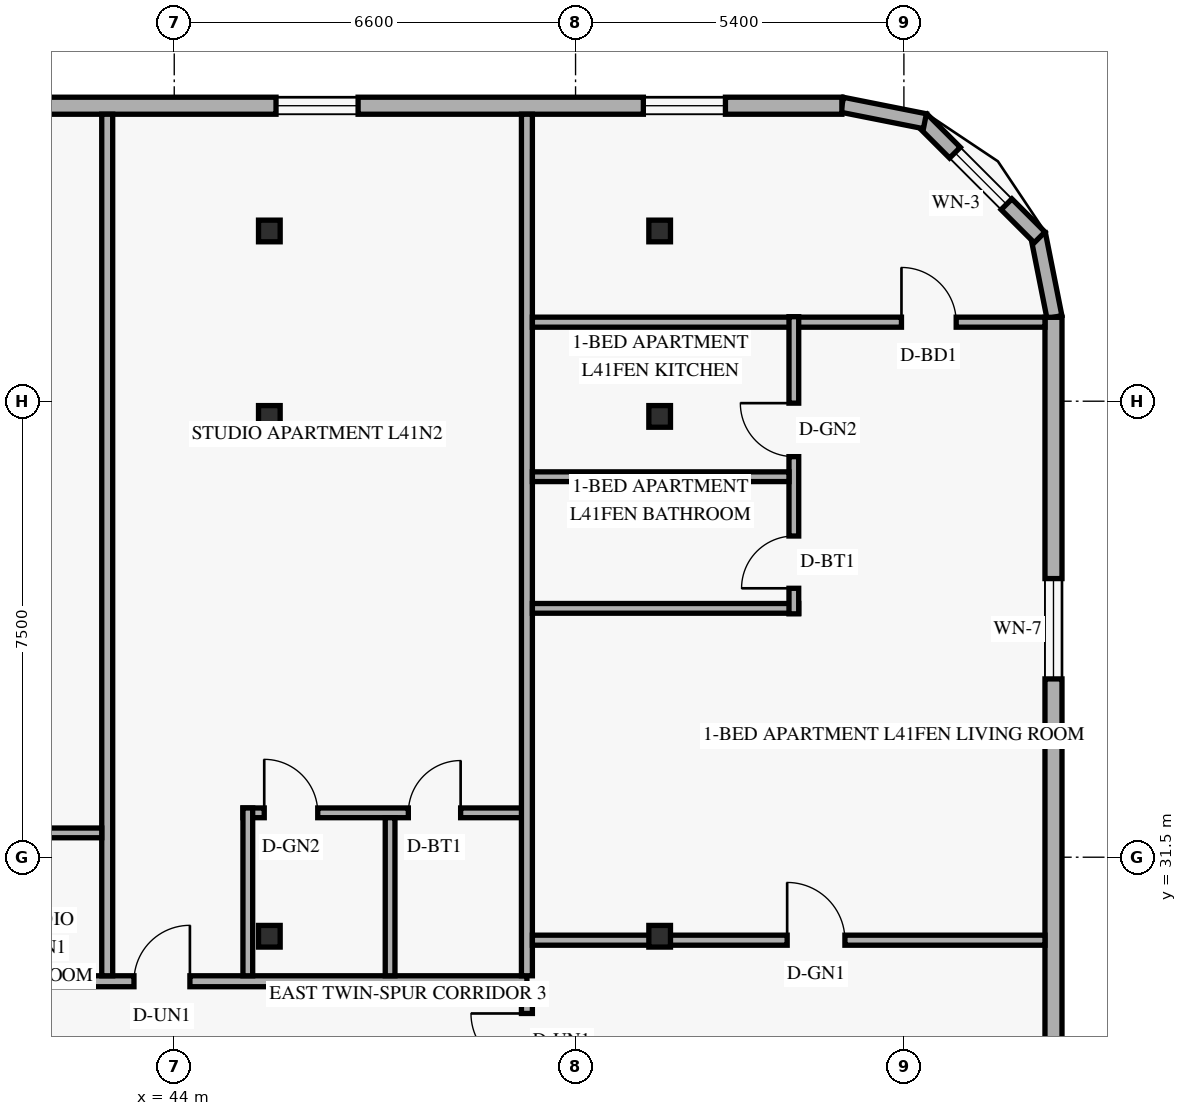
"""IFC4 building model, lengths in metres.
Left out: names, types, materials, properties, quantities, classifications, styles, units other than length and angle.
Written with IfcOpenShell. Run it as: python <this file> out.ifc"""

import sys

from ifc_helpers import new_model, si_unit, direction, frame, frame_2d, origin, origin_2d, place, context, subcontext, project, spatial, rectangle, hollow_rectangle, extrude, element, fill, save


model = new_model("IFC4")
c1 = context("Model", 3, precision=1e-05, world=origin(), true_north=direction((0.0, 1.0)))
c2 = subcontext(c1, "Body", "Model", "MODEL_VIEW")
j1 = project(units=[si_unit("LENGTHUNIT", "METRE"), si_unit("PLANEANGLEUNIT", "RADIAN")], contexts=[c1])
p1 = place(None, origin())
s1 = spatial("IfcSite", under=j1, at=p1, CompositionType="ELEMENT")
p2 = place(p1, origin())
s2 = spatial("IfcBuilding", under=s1, at=p2, CompositionType="ELEMENT")
p3 = place(p2, frame((0.0, 0.0, 159.0)))
s3 = spatial("IfcBuildingStorey", under=s2, at=p3, CompositionType="ELEMENT", Elevation=159.0)
for number, where, z_axis, x_axis in (
    (1, (45.501, 30.2, 0.0), (0.035, 0.0, 0.999), (0.0, 1.0, 0.0)),
    (2, (45.501, 38.75, 0.0), (0.035, 0.0, 0.999), (0.0, 1.0, 0.0)),
    (3, (45.501, 41.8, 0.0), (0.035, 0.0, 0.999), (0.0, 1.0, 0.0)),
):
    element("IfcColumn", number, at=place(p3, frame(where, z_axis=z_axis, x_axis=x_axis)), inside=s3, PredefinedType="COLUMN", context=c2, shape_type="SweptSolid", body=[
        extrude(hollow_rectangle(XDim=0.356, YDim=0.356, WallThickness=0.016, at=origin_2d()), origin(), (0.0, 0.0, 1.0), 3.602),
    ])
for number, where, z_axis, x_axis in (
    (4, (51.879, 30.2, 0.0), (0.058, 0.0, 0.998), (0.0, 1.0, 0.0)),
    (5, (51.879, 38.75, 0.0), (0.058, 0.0, 0.998), (0.0, 1.0, 0.0)),
    (6, (51.879, 41.8, 0.0), (0.058, 0.0, 0.998), (0.0, 1.0, 0.0)),
):
    element("IfcColumn", number, at=place(p3, frame(where, z_axis=z_axis, x_axis=x_axis)), inside=s3, PredefinedType="COLUMN", context=c2, shape_type="SweptSolid", body=[
        extrude(hollow_rectangle(XDim=0.356, YDim=0.356, WallThickness=0.016, at=origin_2d()), origin(), (0.0, 0.0, 1.0), 3.606),
    ])
p4 = place(p3, frame((58.476, 40.384, 0.0), z_axis=(0.0, 0.0, 1.0), x_axis=(-0.19496651342, 0.980809899341, 0.0)))
e7 = element("IfcWall", 7, at=p4, inside=s3, PredefinedType="SOLIDWALL", context=c2, shape_type="SweptSolid", body=[
    extrude(rectangle(XDim=1.389, YDim=0.25, at=frame_2d((0.694, 0.0))), origin(), (0.0, 0.0, 1.0), 3.36),
])
p5 = place(p3, frame((58.232, 41.695, 0.0), z_axis=(0.0, 0.0, 1.0), x_axis=(-0.707106781187, 0.707106781187, 0.0)))
e8 = element("IfcWall", 8, at=p5, inside=s3, PredefinedType="SOLIDWALL", context=c2, shape_type="SweptSolid", body=[
    extrude(rectangle(XDim=2.739, YDim=0.25, at=frame_2d((1.37, 0.0))), origin(), (0.0, 0.0, 1.0), 3.36),
])
p6 = place(p5, frame((0.77, 0.0, 0.85)))
e9 = element("IfcOpeningElement", 9, at=p6, cuts=e8, PredefinedType="OPENING", context=c2, shape_type="SweptSolid", body=[
    extrude(rectangle(XDim=1.2, YDim=1.5, at=frame_2d((0.6, 0.75))), frame((0.0, 0.135, 0.0), z_axis=(0.0, -1.0, 0.0), x_axis=(1.0, 0.0, 0.0)), (0.0, 0.0, 1.0), 0.27),
])
p7 = place(p3, frame((56.345, 43.605, 0.0), z_axis=(0.0, 0.0, 1.0), x_axis=(-0.980809899341, 0.19496651342, 0.0)))
e10 = element("IfcWall", 10, at=p7, inside=s3, PredefinedType="SOLIDWALL", context=c2, shape_type="SweptSolid", body=[
    extrude(rectangle(XDim=1.389, YDim=0.25, at=frame_2d((0.694, 0.0))), origin(), (0.0, 0.0, 1.0), 3.36),
])
p8 = place(p3, frame((58.46, 7.62, 0.0), z_axis=(0.0, 0.0, 1.0), x_axis=(0.0, 1.0, 0.0)))
e11 = element("IfcWall", 11, at=p8, inside=s3, PredefinedType="SOLIDWALL", context=c2, shape_type="SweptSolid", body=[
    extrude(rectangle(XDim=32.76, YDim=0.28, at=frame_2d((16.38, 0.0))), origin(), (0.0, 0.0, 1.0), 3.36),
])
p9 = place(p8, frame((4.29, 0.0, 0.85)))
e12 = element("IfcOpeningElement", 12, at=p9, cuts=e11, PredefinedType="OPENING", context=c2, shape_type="SweptSolid", body=[
    extrude(rectangle(XDim=1.65, YDim=1.6, at=frame_2d((0.825, 0.8))), frame((0.0, 0.15, 0.0), z_axis=(0.0, -1.0, 0.0), x_axis=(1.0, 0.0, 0.0)), (0.0, 0.0, 1.0), 0.3),
])
p10 = place(p8, frame((12.08, 0.0, 0.85)))
e13 = element("IfcOpeningElement", 13, at=p10, cuts=e11, PredefinedType="OPENING", context=c2, shape_type="SweptSolid", body=[
    extrude(rectangle(XDim=1.65, YDim=1.6, at=frame_2d((0.825, 0.8))), frame((0.0, 0.15, 0.0), z_axis=(0.0, -1.0, 0.0), x_axis=(1.0, 0.0, 0.0)), (0.0, 0.0, 1.0), 0.3),
])
p11 = place(p8, frame((18.223, 0.0, 0.85)))
e14 = element("IfcOpeningElement", 14, at=p11, cuts=e11, PredefinedType="OPENING", context=c2, shape_type="SweptSolid", body=[
    extrude(rectangle(XDim=1.65, YDim=1.6, at=frame_2d((0.825, 0.8))), frame((0.0, 0.15, 0.0), z_axis=(0.0, -1.0, 0.0), x_axis=(1.0, 0.0, 0.0)), (0.0, 0.0, 1.0), 0.3),
])
p12 = place(p8, frame((26.812, 0.0, 0.85)))
e15 = element("IfcOpeningElement", 15, at=p12, cuts=e11, PredefinedType="OPENING", context=c2, shape_type="SweptSolid", body=[
    extrude(rectangle(XDim=1.65, YDim=1.6, at=frame_2d((0.825, 0.8))), frame((0.0, 0.15, 0.0), z_axis=(0.0, -1.0, 0.0), x_axis=(1.0, 0.0, 0.0)), (0.0, 0.0, 1.0), 0.3),
])
p13 = place(p3, frame((54.98, 43.86, 0.0), z_axis=(0.0, 0.0, 1.0), x_axis=(-1.0, 0.0, 0.0)))
e16 = element("IfcWall", 16, at=p13, inside=s3, PredefinedType="SOLIDWALL", context=c2, shape_type="SweptSolid", body=[
    extrude(rectangle(XDim=33.76, YDim=0.28, at=frame_2d((16.88, 0.0))), origin(), (0.0, 0.0, 1.0), 3.36),
])
p14 = place(p13, frame((28.705, 0.0, 0.85)))
e17 = element("IfcOpeningElement", 17, at=p14, cuts=e16, PredefinedType="OPENING", context=c2, shape_type="SweptSolid", body=[
    extrude(rectangle(XDim=1.35, YDim=1.55, at=frame_2d((0.675, 0.775))), frame((0.0, 0.15, 0.0), z_axis=(0.0, -1.0, 0.0), x_axis=(1.0, 0.0, 0.0)), (0.0, 0.0, 1.0), 0.3),
])
p15 = place(p13, frame((21.82, 0.0, 0.85)))
e18 = element("IfcOpeningElement", 18, at=p15, cuts=e16, PredefinedType="OPENING", context=c2, shape_type="SweptSolid", body=[
    extrude(rectangle(XDim=1.35, YDim=1.55, at=frame_2d((0.675, 0.775))), frame((0.0, 0.15, 0.0), z_axis=(0.0, -1.0, 0.0), x_axis=(1.0, 0.0, 0.0)), (0.0, 0.0, 1.0), 0.3),
])
p16 = place(p13, frame((15.146, 0.0, 0.85)))
e19 = element("IfcOpeningElement", 19, at=p16, cuts=e16, PredefinedType="OPENING", context=c2, shape_type="SweptSolid", body=[
    extrude(rectangle(XDim=1.35, YDim=1.55, at=frame_2d((0.675, 0.775))), frame((0.0, 0.15, 0.0), z_axis=(0.0, -1.0, 0.0), x_axis=(1.0, 0.0, 0.0)), (0.0, 0.0, 1.0), 0.3),
])
p17 = place(p13, frame((7.956, 0.0, 0.85)))
e20 = element("IfcOpeningElement", 20, at=p17, cuts=e16, PredefinedType="OPENING", context=c2, shape_type="SweptSolid", body=[
    extrude(rectangle(XDim=1.35, YDim=1.55, at=frame_2d((0.675, 0.775))), frame((0.0, 0.15, 0.0), z_axis=(0.0, -1.0, 0.0), x_axis=(1.0, 0.0, 0.0)), (0.0, 0.0, 1.0), 0.3),
])
p18 = place(p13, frame((1.915, 0.0, 0.85)))
e21 = element("IfcOpeningElement", 21, at=p18, cuts=e16, PredefinedType="OPENING", context=c2, shape_type="SweptSolid", body=[
    extrude(rectangle(XDim=1.35, YDim=1.55, at=frame_2d((0.675, 0.775))), frame((0.0, 0.15, 0.0), z_axis=(0.0, -1.0, 0.0), x_axis=(1.0, 0.0, 0.0)), (0.0, 0.0, 1.0), 0.3),
])
p19 = place(p3, frame((35.51, 29.46, 0.0), z_axis=(0.0, 0.0, 1.0), x_axis=(1.0, 0.0, 0.0)))
e22 = element("IfcWall", 22, at=p19, inside=s3, PredefinedType="STANDARD", context=c2, shape_type="SweptSolid", body=[
    extrude(rectangle(XDim=14.29, YDim=0.18, at=frame_2d((7.145, 0.0))), origin(), (0.0, 0.0, 1.0), 2.73),
])
p20 = place(p19, frame((0.35, 0.0, 0.0)))
e23 = element("IfcOpeningElement", 23, at=p20, cuts=e22, PredefinedType="OPENING", context=c2, shape_type="SweptSolid", body=[
    extrude(rectangle(XDim=0.92, YDim=2.15, at=frame_2d((0.46, 1.075))), frame((0.0, 0.1, 0.0), z_axis=(0.0, -1.0, 0.0), x_axis=(1.0, 0.0, 0.0)), (0.0, 0.0, 1.0), 0.2),
])
p21 = place(p19, frame((7.828, 0.0, 0.0)))
e24 = element("IfcOpeningElement", 24, at=p21, cuts=e22, PredefinedType="OPENING", context=c2, shape_type="SweptSolid", body=[
    extrude(rectangle(XDim=0.92, YDim=2.15, at=frame_2d((0.46, 1.075))), frame((0.0, 0.1, 0.0), z_axis=(0.0, -1.0, 0.0), x_axis=(1.0, 0.0, 0.0)), (0.0, 0.0, 1.0), 0.2),
])
p22 = place(p3, frame((42.898, 29.55, 0.0), z_axis=(0.0, 0.0, 1.0), x_axis=(0.0, 1.0, 0.0)))
e25 = element("IfcWall", 25, at=p22, inside=s3, PredefinedType="PARTITIONING", context=c2, shape_type="SweptSolid", body=[
    extrude(rectangle(XDim=14.17, YDim=0.18, at=frame_2d((7.085, 0.0))), origin(), (0.0, 0.0, 1.0), 2.73),
])
p23 = place(p3, frame((38.228, 31.9, 0.0), z_axis=(0.0, 0.0, 1.0), x_axis=(1.0, 0.0, 0.0)))
e26 = element("IfcWall", 26, at=p23, inside=s3, PredefinedType="PLUMBINGWALL", context=c2, shape_type="SweptSolid", body=[
    extrude(rectangle(XDim=4.58, YDim=0.16, at=frame_2d((2.29, 0.0))), origin(), (0.0, 0.0, 1.0), 3.36),
])
p24 = place(p23, frame((0.35, 0.0, 0.0)))
e27 = element("IfcOpeningElement", 27, at=p24, cuts=e26, PredefinedType="OPENING", context=c2, shape_type="SweptSolid", body=[
    extrude(rectangle(XDim=0.88, YDim=2.12, at=frame_2d((0.44, 1.06))), frame((0.0, 0.09, 0.0), z_axis=(0.0, -1.0, 0.0), x_axis=(1.0, 0.0, 0.0)), (0.0, 0.0, 1.0), 0.18),
])
p25 = place(p23, frame((2.72, 0.0, 0.0)))
e28 = element("IfcOpeningElement", 28, at=p25, cuts=e26, PredefinedType="OPENING", context=c2, shape_type="SweptSolid", body=[
    extrude(rectangle(XDim=0.86, YDim=2.12, at=frame_2d((0.43, 1.06))), frame((0.0, 0.09, 0.0), z_axis=(0.0, -1.0, 0.0), x_axis=(1.0, 0.0, 0.0)), (0.0, 0.0, 1.0), 0.18),
])
p26 = place(p3, frame((45.13, 32.23, 0.0), z_axis=(0.0, 0.0, 1.0), x_axis=(1.0, 0.0, 0.0)))
e29 = element("IfcWall", 29, at=p26, inside=s3, PredefinedType="PLUMBINGWALL", context=c2, shape_type="SweptSolid", body=[
    extrude(rectangle(XDim=4.67, YDim=0.16, at=frame_2d((2.335, 0.0))), origin(), (0.0, 0.0, 1.0), 2.73),
])
p27 = place(p26, frame((0.35, 0.0, 0.0)))
e30 = element("IfcOpeningElement", 30, at=p27, cuts=e29, PredefinedType="OPENING", context=c2, shape_type="SweptSolid", body=[
    extrude(rectangle(XDim=0.88, YDim=2.12, at=frame_2d((0.44, 1.06))), frame((0.0, 0.09, 0.0), z_axis=(0.0, -1.0, 0.0), x_axis=(1.0, 0.0, 0.0)), (0.0, 0.0, 1.0), 0.18),
])
p28 = place(p26, frame((2.72, 0.0, 0.0)))
e31 = element("IfcOpeningElement", 31, at=p28, cuts=e29, PredefinedType="OPENING", context=c2, shape_type="SweptSolid", body=[
    extrude(rectangle(XDim=0.86, YDim=2.12, at=frame_2d((0.43, 1.06))), frame((0.0, 0.09, 0.0), z_axis=(0.0, -1.0, 0.0), x_axis=(1.0, 0.0, 0.0)), (0.0, 0.0, 1.0), 0.18),
])
p29 = place(p3, frame((45.21, 29.55, 0.0), z_axis=(0.0, 0.0, 1.0), x_axis=(0.0, 1.0, 0.0)))
e32 = element("IfcWall", 32, at=p29, inside=s3, PredefinedType="PLUMBINGWALL", context=c2, shape_type="SweptSolid", body=[
    extrude(rectangle(XDim=2.76, YDim=0.16, at=frame_2d((1.38, 0.0))), origin(), (0.0, 0.0, 1.0), 2.73),
])
p30 = place(p3, frame((47.55, 29.55, 0.0), z_axis=(0.0, 0.0, 1.0), x_axis=(0.0, 1.0, 0.0)))
e33 = element("IfcWall", 33, at=p30, inside=s3, PredefinedType="PLUMBINGWALL", context=c2, shape_type="SweptSolid", body=[
    extrude(rectangle(XDim=2.6, YDim=0.16, at=frame_2d((1.3, 0.0))), origin(), (0.0, 0.0, 1.0), 2.73),
])
p31 = place(p3, frame((49.8, 27.65, 0.0), z_axis=(0.0, 0.0, 1.0), x_axis=(0.0, 1.0, 0.0)))
e34 = element("IfcWall", 34, at=p31, inside=s3, PredefinedType="STANDARD", context=c2, shape_type="SweptSolid", body=[
    extrude(rectangle(XDim=1.72, YDim=0.18, at=frame_2d((0.86, 0.0))), origin(), (0.0, 0.0, 1.0), 3.36),
])
p32 = place(p31, frame((0.36, 0.0, 0.0)))
e35 = element("IfcOpeningElement", 35, at=p32, cuts=e34, PredefinedType="OPENING", context=c2, shape_type="SweptSolid", body=[
    extrude(rectangle(XDim=0.92, YDim=2.15, at=frame_2d((0.46, 1.075))), frame((0.0, 0.1, 0.0), z_axis=(0.0, -1.0, 0.0), x_axis=(1.0, 0.0, 0.0)), (0.0, 0.0, 1.0), 0.2),
])
p33 = place(p3, frame((49.8, 29.55, 0.0), z_axis=(0.0, 0.0, 1.0), x_axis=(0.0, 1.0, 0.0)))
e36 = element("IfcWall", 36, at=p33, inside=s3, PredefinedType="PARTITIONING", context=c2, shape_type="SweptSolid", body=[
    extrude(rectangle(XDim=14.17, YDim=0.18, at=frame_2d((7.085, 0.0))), origin(), (0.0, 0.0, 1.0), 2.73),
])
p34 = place(p3, frame((49.89, 40.3, 0.0), z_axis=(0.0, 0.0, 1.0), x_axis=(1.0, 0.0, 0.0)))
e37 = element("IfcWall", 37, at=p34, inside=s3, PredefinedType="PARTITIONING", context=c2, shape_type="SweptSolid", body=[
    extrude(rectangle(XDim=8.43, YDim=0.165, at=frame_2d((4.215, 0.0))), origin(), (0.0, 0.0, 1.0), 2.879),
])
p35 = place(p34, frame((6.07, 0.0, 0.0)))
e38 = element("IfcOpeningElement", 38, at=p35, cuts=e37, PredefinedType="OPENING", context=c2, shape_type="SweptSolid", body=[
    extrude(rectangle(XDim=0.9, YDim=2.14, at=frame_2d((0.45, 1.07))), frame((0.0, 0.093, 0.0), z_axis=(0.0, -1.0, 0.0), x_axis=(1.0, 0.0, 0.0)), (0.0, 0.0, 1.0), 0.185),
])
p36 = place(p3, frame((49.89, 35.593, 0.0), z_axis=(0.0, 0.0, 1.0), x_axis=(1.0, 0.0, 0.0)))
e39 = element("IfcWall", 39, at=p36, inside=s3, PredefinedType="PLUMBINGWALL", context=c2, shape_type="SweptSolid", body=[
    extrude(rectangle(XDim=4.38, YDim=0.16, at=frame_2d((2.19, 0.0))), origin(), (0.0, 0.0, 1.0), 2.879),
])
p37 = place(p3, frame((54.19, 35.503, 0.0), z_axis=(0.0, 0.0, 1.0), x_axis=(0.0, 1.0, 0.0)))
e40 = element("IfcWall", 40, at=p37, inside=s3, PredefinedType="PLUMBINGWALL", context=c2, shape_type="SweptSolid", body=[
    extrude(rectangle(XDim=4.887, YDim=0.16, at=frame_2d((2.443, 0.0))), origin(), (0.0, 0.0, 1.0), 3.36),
])
p38 = place(p37, frame((0.42, 0.0, 0.0)))
e41 = element("IfcOpeningElement", 41, at=p38, cuts=e40, PredefinedType="OPENING", context=c2, shape_type="SweptSolid", body=[
    extrude(rectangle(XDim=0.86, YDim=2.12, at=frame_2d((0.43, 1.06))), frame((0.0, 0.09, 0.0), z_axis=(0.0, -1.0, 0.0), x_axis=(1.0, 0.0, 0.0)), (0.0, 0.0, 1.0), 0.18),
])
p39 = place(p37, frame((2.585, 0.0, 0.0)))
e42 = element("IfcOpeningElement", 42, at=p39, cuts=e40, PredefinedType="OPENING", context=c2, shape_type="SweptSolid", body=[
    extrude(rectangle(XDim=0.88, YDim=2.12, at=frame_2d((0.44, 1.06))), frame((0.0, 0.09, 0.0), z_axis=(0.0, -1.0, 0.0), x_axis=(1.0, 0.0, 0.0)), (0.0, 0.0, 1.0), 0.18),
])
p40 = place(p3, frame((49.89, 37.758, 0.0), z_axis=(0.0, 0.0, 1.0), x_axis=(1.0, 0.0, 0.0)))
e43 = element("IfcWall", 43, at=p40, inside=s3, PredefinedType="PLUMBINGWALL", context=c2, shape_type="SweptSolid", body=[
    extrude(rectangle(XDim=4.22, YDim=0.16, at=frame_2d((2.11, 0.0))), origin(), (0.0, 0.0, 1.0), 2.879),
])
p41 = place(p3, frame((49.89, 30.135, 0.0), z_axis=(0.0, 0.0, 1.0), x_axis=(1.0, 0.0, 0.0)))
e44 = element("IfcWall", 44, at=p41, inside=s3, PredefinedType="PARTITIONING", context=c2, shape_type="SweptSolid", body=[
    extrude(rectangle(XDim=8.43, YDim=0.165, at=frame_2d((4.215, 0.0))), origin(), (0.0, 0.0, 1.0), 2.73),
])
p42 = place(p41, frame((4.19, 0.0, 0.0)))
e45 = element("IfcOpeningElement", 45, at=p42, cuts=e44, PredefinedType="OPENING", context=c2, shape_type="SweptSolid", body=[
    extrude(rectangle(XDim=0.95, YDim=2.15, at=frame_2d((0.475, 1.075))), frame((0.0, 0.093, 0.0), z_axis=(0.0, -1.0, 0.0), x_axis=(1.0, 0.0, 0.0)), (0.0, 0.0, 1.0), 0.185),
])
p43 = place(p6, origin())
e46 = element("IfcWindow", 46, at=p43, inside=s3, PartitioningType="SINGLE_PANEL", PredefinedType="WINDOW", context=c2, shape_type="SweptSolid", body=[
    extrude(rectangle(XDim=1.2, YDim=1.5, at=frame_2d((0.6, 0.75))), frame((0.0, 0.03, 0.0), z_axis=(0.0, -1.0, 0.0), x_axis=(1.0, 0.0, 0.0)), (0.0, 0.0, 1.0), 0.06),
])
fill(e9, e46)
p44 = place(p12, origin())
e47 = element("IfcWindow", 47, at=p44, inside=s3, PartitioningType="SINGLE_PANEL", PredefinedType="WINDOW", context=c2, shape_type="SweptSolid", body=[
    extrude(rectangle(XDim=1.65, YDim=1.6, at=frame_2d((0.825, 0.8))), frame((0.0, 0.03, 0.0), z_axis=(0.0, -1.0, 0.0), x_axis=(1.0, 0.0, 0.0)), (0.0, 0.0, 1.0), 0.06),
])
fill(e15, e47)
p45 = place(p17, origin())
e48 = element("IfcWindow", 48, at=p45, inside=s3, PartitioningType="SINGLE_PANEL", PredefinedType="WINDOW", context=c2, shape_type="SweptSolid", body=[
    extrude(rectangle(XDim=1.35, YDim=1.55, at=frame_2d((0.675, 0.775))), frame((0.0, 0.03, 0.0), z_axis=(0.0, -1.0, 0.0), x_axis=(1.0, 0.0, 0.0)), (0.0, 0.0, 1.0), 0.06),
])
fill(e20, e48)
p46 = place(p18, origin())
e49 = element("IfcWindow", 49, at=p46, inside=s3, PartitioningType="SINGLE_PANEL", PredefinedType="WINDOW", context=c2, shape_type="SweptSolid", body=[
    extrude(rectangle(XDim=1.35, YDim=1.55, at=frame_2d((0.675, 0.775))), frame((0.0, 0.03, 0.0), z_axis=(0.0, -1.0, 0.0), x_axis=(1.0, 0.0, 0.0)), (0.0, 0.0, 1.0), 0.06),
])
fill(e21, e49)
p47 = place(p21, origin())
e50 = element("IfcDoor", 50, at=p47, inside=s3, OperationType="SINGLE_SWING_RIGHT", PredefinedType="DOOR", context=c2, shape_type="SweptSolid", body=[
    extrude(rectangle(XDim=0.92, YDim=2.15, at=frame_2d((0.46, 1.075))), frame((0.0, 0.025, 0.0), z_axis=(0.0, -1.0, 0.0), x_axis=(1.0, 0.0, 0.0)), (0.0, 0.0, 1.0), 0.05),
])
fill(e24, e50)
p48 = place(p27, origin())
e51 = element("IfcDoor", 51, at=p48, inside=s3, OperationType="SINGLE_SWING_LEFT", PredefinedType="DOOR", context=c2, shape_type="SweptSolid", body=[
    extrude(rectangle(XDim=0.88, YDim=2.12, at=frame_2d((0.44, 1.06))), frame((0.0, 0.025, 0.0), z_axis=(0.0, -1.0, 0.0), x_axis=(1.0, 0.0, 0.0)), (0.0, 0.0, 1.0), 0.05),
])
fill(e30, e51)
p49 = place(p28, origin())
e52 = element("IfcDoor", 52, at=p49, inside=s3, OperationType="SINGLE_SWING_RIGHT", PredefinedType="DOOR", context=c2, shape_type="SweptSolid", body=[
    extrude(rectangle(XDim=0.86, YDim=2.12, at=frame_2d((0.43, 1.06))), frame((0.0, 0.025, 0.0), z_axis=(0.0, -1.0, 0.0), x_axis=(1.0, 0.0, 0.0)), (0.0, 0.0, 1.0), 0.05),
])
fill(e31, e52)
p50 = place(p42, origin())
e53 = element("IfcDoor", 53, at=p50, inside=s3, OperationType="SINGLE_SWING_LEFT", PredefinedType="DOOR", context=c2, shape_type="SweptSolid", body=[
    extrude(rectangle(XDim=0.95, YDim=2.15, at=frame_2d((0.475, 1.075))), frame((0.0, 0.025, 0.0), z_axis=(0.0, -1.0, 0.0), x_axis=(1.0, 0.0, 0.0)), (0.0, 0.0, 1.0), 0.05),
])
fill(e45, e53)
p51 = place(p32, origin())
e54 = element("IfcDoor", 54, at=p51, inside=s3, OperationType="SINGLE_SWING_RIGHT", PredefinedType="DOOR", context=c2, shape_type="SweptSolid", body=[
    extrude(rectangle(XDim=0.92, YDim=2.15, at=frame_2d((0.46, 1.075))), frame((0.0, 0.025, 0.0), z_axis=(0.0, -1.0, 0.0), x_axis=(1.0, 0.0, 0.0)), (0.0, 0.0, 1.0), 0.05),
])
fill(e35, e54)
p52 = place(p38, origin())
e55 = element("IfcDoor", 55, at=p52, inside=s3, OperationType="SINGLE_SWING_LEFT", PredefinedType="DOOR", context=c2, shape_type="SweptSolid", body=[
    extrude(rectangle(XDim=0.86, YDim=2.12, at=frame_2d((0.43, 1.06))), frame((0.0, 0.025, 0.0), z_axis=(0.0, -1.0, 0.0), x_axis=(1.0, 0.0, 0.0)), (0.0, 0.0, 1.0), 0.05),
])
fill(e41, e55)
p53 = place(p39, origin())
e56 = element("IfcDoor", 56, at=p53, inside=s3, OperationType="SINGLE_SWING_RIGHT", PredefinedType="DOOR", context=c2, shape_type="SweptSolid", body=[
    extrude(rectangle(XDim=0.88, YDim=2.12, at=frame_2d((0.44, 1.06))), frame((0.0, 0.025, 0.0), z_axis=(0.0, -1.0, 0.0), x_axis=(1.0, 0.0, 0.0)), (0.0, 0.0, 1.0), 0.05),
])
fill(e42, e56)
p54 = place(p35, origin())
e57 = element("IfcDoor", 57, at=p54, inside=s3, OperationType="SINGLE_SWING_LEFT", PredefinedType="DOOR", context=c2, shape_type="SweptSolid", body=[
    extrude(rectangle(XDim=0.9, YDim=2.14, at=frame_2d((0.45, 1.07))), frame((0.0, 0.025, 0.0), z_axis=(0.0, -1.0, 0.0), x_axis=(1.0, 0.0, 0.0)), (0.0, 0.0, 1.0), 0.05),
])
fill(e38, e57)
save(model, sys.argv[1])
